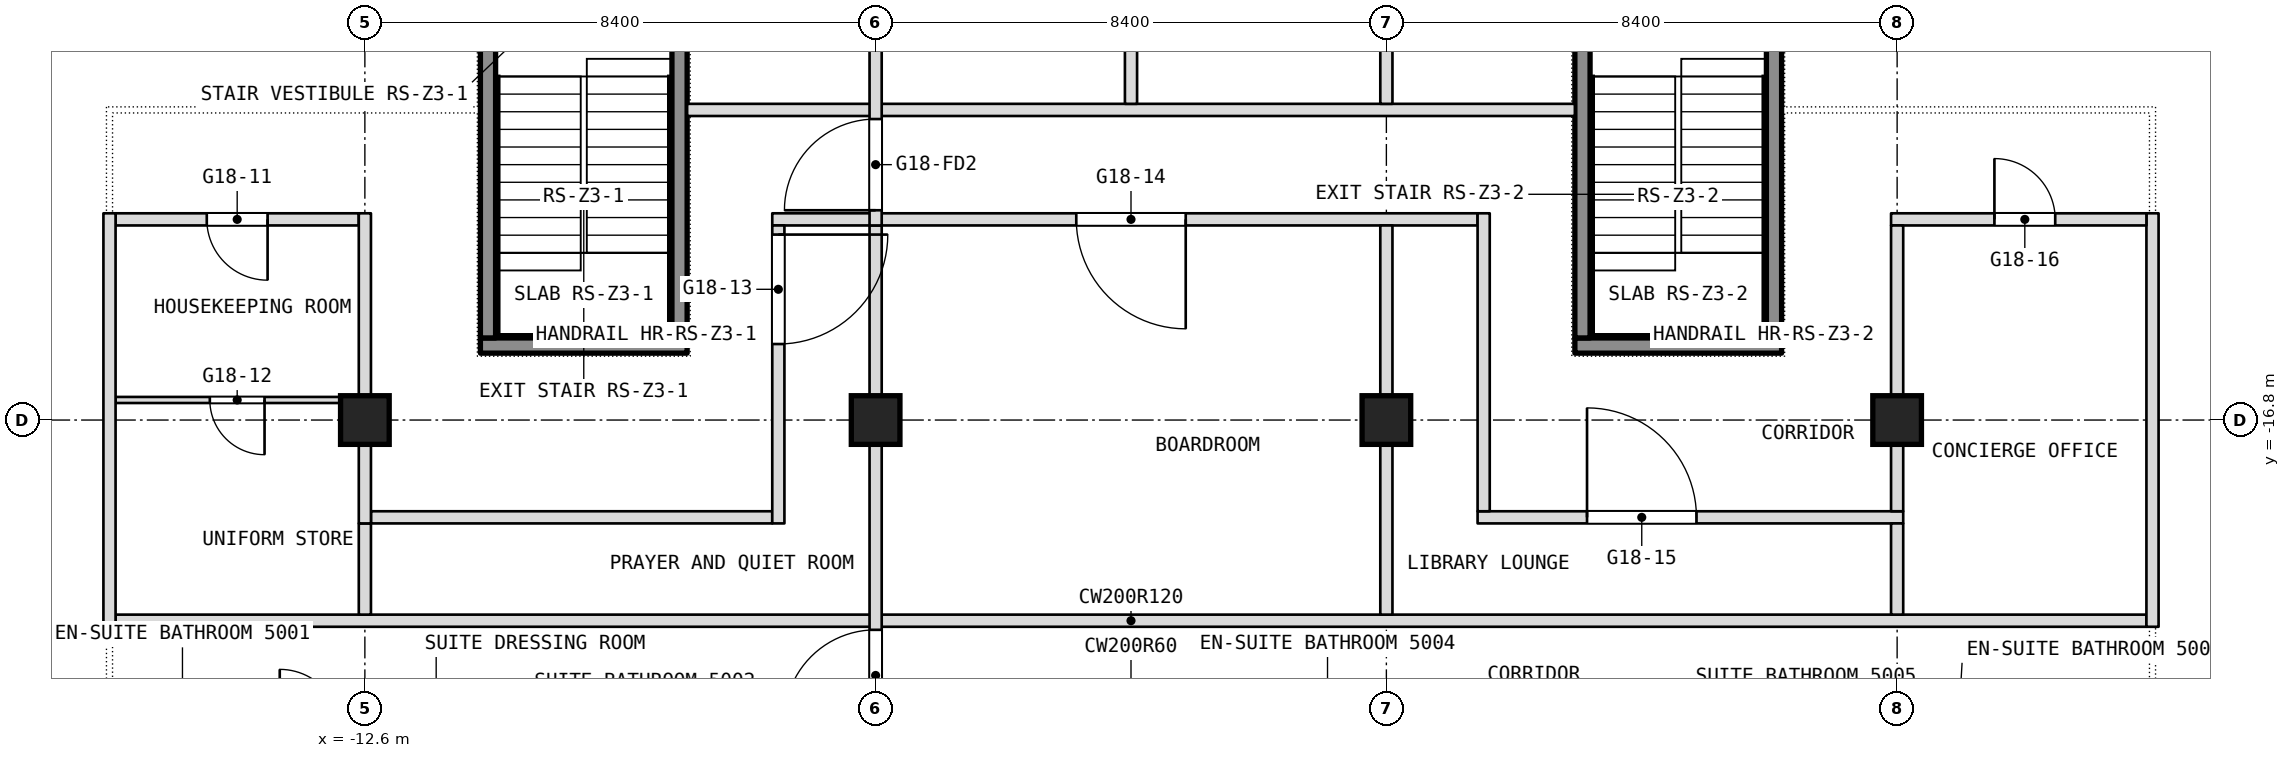
"""IFC4 building model, lengths in metres.
Left out: names, types, materials, properties, quantities, classifications, styles, units other than length and angle.
Written with IfcOpenShell. Run it as: python <this file> out.ifc"""

import sys

from ifc_helpers import new_model, si_unit, direction, frame, frame_2d, origin, origin_2d, place, context, subcontext, project, spatial, rectangle, extrude, element, fill, save


model = new_model("IFC4")
c1 = context("Model", 3, precision=1e-05, world=origin(), true_north=direction((0.0, 1.0)))
c2 = subcontext(c1, "Body", "Model", "MODEL_VIEW")
j1 = project(units=[si_unit("LENGTHUNIT", "METRE"), si_unit("PLANEANGLEUNIT", "RADIAN")], contexts=[c1])
p1 = place(None, origin())
s1 = spatial("IfcSite", under=j1, at=p1, CompositionType="ELEMENT")
p2 = place(p1, origin())
s2 = spatial("IfcBuilding", under=s1, at=p2, CompositionType="ELEMENT")
p3 = place(p2, frame((0.0, 0.0, 216.5)))
s3 = spatial("IfcBuildingStorey", under=s2, at=p3, CompositionType="ELEMENT", Elevation=216.5)
for number, where, z_axis, x_axis in (
    (1, (-12.6, -16.8, 0.0), (0.0, 0.0, 1.0), (1.0, 0.0, 0.0)),
    (2, (-4.2, -16.8, 0.0), (0.0, 0.0, 1.0), (1.0, 0.0, 0.0)),
    (3, (4.2, -16.8, 0.0), (0.0, 0.0, 1.0), (1.0, 0.0, 0.0)),
    (4, (12.6, -16.8, 0.0), (0.0, 0.0, 1.0), (1.0, 0.0, 0.0)),
):
    element("IfcColumn", number, at=place(p3, frame(where, z_axis=z_axis, x_axis=x_axis)), inside=s3, PredefinedType="COLUMN", context=c2, shape_type="SweptSolid", body=[
        extrude(rectangle(XDim=0.8, YDim=0.8, at=origin_2d()), origin(), (0.0, 0.0, 1.0), 3.6),
    ])
p4 = place(p3, frame((-16.7, -20.1, 0.0), z_axis=(0.0, 0.0, 1.0), x_axis=(1.0, 0.0, 0.0)))
e5 = element("IfcWall", 5, at=p4, inside=s3, PredefinedType="PARTITIONING", context=c2, shape_type="SweptSolid", body=[
    extrude(rectangle(XDim=33.4, YDim=0.2, at=frame_2d((16.7, 0.0))), origin(), (0.0, 0.0, 1.0), 3.34),
])
p5 = place(p3, frame((-12.5, -18.4, 0.0), z_axis=(0.0, 0.0, 1.0), x_axis=(1.0, 0.0, 0.0)))
e6 = element("IfcWall", 6, at=p5, inside=s3, PredefinedType="PARTITIONING", context=c2, shape_type="SweptSolid", body=[
    extrude(rectangle(XDim=6.6, YDim=0.2, at=frame_2d((3.3, 0.0))), origin(), (0.0, 0.0, 1.0), 3.34),
])
p6 = place(p3, frame((5.7, -18.4, 0.0), z_axis=(0.0, 0.0, 1.0), x_axis=(1.0, 0.0, 0.0)))
e7 = element("IfcWall", 7, at=p6, inside=s3, PredefinedType="PARTITIONING", context=c2, shape_type="SweptSolid", body=[
    extrude(rectangle(XDim=7.0, YDim=0.2, at=frame_2d((3.5, 0.0))), origin(), (0.0, 0.0, 1.0), 3.34),
])
p7 = place(p6, frame((1.8, 0.0, 0.0)))
e8 = element("IfcOpeningElement", 8, at=p7, cuts=e7, PredefinedType="OPENING", context=c2, shape_type="SweptSolid", body=[
    extrude(rectangle(XDim=1.8, YDim=2.1, at=frame_2d((0.9, 1.05))), frame((0.0, 0.1, 0.0), z_axis=(0.0, -1.0, 0.0), x_axis=(1.0, 0.0, 0.0)), (0.0, 0.0, 1.0), 0.2),
])
p8 = place(p3, frame((16.8, -20.2, 0.0), z_axis=(0.0, 0.0, 1.0), x_axis=(0.0, 1.0, 0.0)))
e9 = element("IfcWall", 9, at=p8, inside=s3, PredefinedType="PARTITIONING", context=c2, shape_type="SweptSolid", body=[
    extrude(rectangle(XDim=6.8, YDim=0.2, at=frame_2d((3.4, 0.0))), origin(), (0.0, 0.0, 1.0), 3.34),
])
p9 = place(p3, frame((-16.7, -16.47, 0.0), z_axis=(0.0, 0.0, 1.0), x_axis=(1.0, 0.0, 0.0)))
e10 = element("IfcWall", 10, at=p9, inside=s3, PredefinedType="PARTITIONING", context=c2, shape_type="SweptSolid", body=[
    extrude(rectangle(XDim=4.0, YDim=0.1, at=frame_2d((2.0, 0.0))), origin(), (0.0, 0.0, 1.0), 3.34),
])
p10 = place(p9, frame((1.55, 0.0, 0.0)))
e11 = element("IfcOpeningElement", 11, at=p10, cuts=e10, PredefinedType="OPENING", context=c2, shape_type="SweptSolid", body=[
    extrude(rectangle(XDim=0.9, YDim=2.1, at=frame_2d((0.45, 1.05))), frame((0.0, 0.05, 0.0), z_axis=(0.0, -1.0, 0.0), x_axis=(1.0, 0.0, 0.0)), (0.0, 0.0, 1.0), 0.1),
])
p11 = place(p3, frame((-16.7, -13.5, 0.0), z_axis=(0.0, 0.0, 1.0), x_axis=(1.0, 0.0, 0.0)))
e12 = element("IfcWall", 12, at=p11, inside=s3, PredefinedType="PARTITIONING", context=c2, shape_type="SweptSolid", body=[
    extrude(rectangle(XDim=4.0, YDim=0.2, at=frame_2d((2.0, 0.0))), origin(), (0.0, 0.0, 1.0), 3.34),
])
p12 = place(p11, frame((1.5, 0.0, 0.0)))
e13 = element("IfcOpeningElement", 13, at=p12, cuts=e12, PredefinedType="OPENING", context=c2, shape_type="SweptSolid", body=[
    extrude(rectangle(XDim=1.0, YDim=2.1, at=frame_2d((0.5, 1.05))), frame((0.0, 0.1, 0.0), z_axis=(0.0, -1.0, 0.0), x_axis=(1.0, 0.0, 0.0)), (0.0, 0.0, 1.0), 0.2),
])
p13 = place(p3, frame((-5.9, -13.5, 0.0), z_axis=(0.0, 0.0, 1.0), x_axis=(1.0, 0.0, 0.0)))
e14 = element("IfcWall", 14, at=p13, inside=s3, PredefinedType="PARTITIONING", context=c2, shape_type="SweptSolid", body=[
    extrude(rectangle(XDim=11.6, YDim=0.2, at=frame_2d((5.8, 0.0))), origin(), (0.0, 0.0, 1.0), 3.34),
])
p14 = place(p13, frame((5.0, 0.0, 0.0)))
e15 = element("IfcOpeningElement", 15, at=p14, cuts=e14, PredefinedType="OPENING", context=c2, shape_type="SweptSolid", body=[
    extrude(rectangle(XDim=1.8, YDim=2.1, at=frame_2d((0.9, 1.05))), frame((0.0, 0.1, 0.0), z_axis=(0.0, -1.0, 0.0), x_axis=(1.0, 0.0, 0.0)), (0.0, 0.0, 1.0), 0.2),
])
p15 = place(p3, frame((12.5, -13.5, 0.0), z_axis=(0.0, 0.0, 1.0), x_axis=(1.0, 0.0, 0.0)))
e16 = element("IfcWall", 16, at=p15, inside=s3, PredefinedType="PARTITIONING", context=c2, shape_type="SweptSolid", body=[
    extrude(rectangle(XDim=4.2, YDim=0.2, at=frame_2d((2.1, 0.0))), origin(), (0.0, 0.0, 1.0), 3.34),
])
p16 = place(p15, frame((1.7, 0.0, 0.0)))
e17 = element("IfcOpeningElement", 17, at=p16, cuts=e16, PredefinedType="OPENING", context=c2, shape_type="SweptSolid", body=[
    extrude(rectangle(XDim=1.0, YDim=2.1, at=frame_2d((0.5, 1.05))), frame((0.0, 0.1, 0.0), z_axis=(0.0, -1.0, 0.0), x_axis=(1.0, 0.0, 0.0)), (0.0, 0.0, 1.0), 0.2),
])
p17 = place(p3, frame((12.6, -20.0, 0.0), z_axis=(0.0, 0.0, 1.0), x_axis=(0.0, 1.0, 0.0)))
e18 = element("IfcWall", 18, at=p17, inside=s3, PredefinedType="PARTITIONING", context=c2, shape_type="SweptSolid", body=[
    extrude(rectangle(XDim=1.5, YDim=0.2, at=frame_2d((0.75, 0.0))), origin(), (0.0, 0.0, 1.0), 3.34),
])
p18 = place(p3, frame((12.6, -18.3, 0.0), z_axis=(0.0, 0.0, 1.0), x_axis=(0.0, 1.0, 0.0)))
e19 = element("IfcWall", 19, at=p18, inside=s3, PredefinedType="PARTITIONING", context=c2, shape_type="SweptSolid", body=[
    extrude(rectangle(XDim=4.7, YDim=0.2, at=frame_2d((2.35, 0.0))), origin(), (0.0, 0.0, 1.0), 3.34),
])
p19 = place(p3, frame((-7.3, -11.7, 0.0), z_axis=(0.0, 0.0, 1.0), x_axis=(1.0, 0.0, 0.0)))
e20 = element("IfcWall", 20, at=p19, inside=s3, PredefinedType="PARTITIONING", context=c2, shape_type="SweptSolid", body=[
    extrude(rectangle(XDim=14.6, YDim=0.2, at=frame_2d((7.3, 0.0))), origin(), (0.0, 0.0, 1.0), 3.34),
])
p20 = place(p3, frame((5.8, -18.3, 0.0), z_axis=(0.0, 0.0, 1.0), x_axis=(0.0, 1.0, 0.0)))
e21 = element("IfcWall", 21, at=p20, inside=s3, PredefinedType="PARTITIONING", context=c2, shape_type="SweptSolid", body=[
    extrude(rectangle(XDim=4.9, YDim=0.2, at=frame_2d((2.45, 0.0))), origin(), (0.0, 0.0, 1.0), 3.34),
])
p21 = place(p3, frame((4.2, -20.0, 0.0), z_axis=(0.0, 0.0, 1.0), x_axis=(0.0, 1.0, 0.0)))
e22 = element("IfcWall", 22, at=p21, inside=s3, PredefinedType="PARTITIONING", context=c2, shape_type="SweptSolid", body=[
    extrude(rectangle(XDim=6.4, YDim=0.2, at=frame_2d((3.2, 0.0))), origin(), (0.0, 0.0, 1.0), 3.34),
])
for number, where, z_axis, x_axis in (
    (23, (4.2, -11.6, 0.0), (0.0, 0.0, 1.0), (0.0, 1.0, 0.0)),
    (24, (0.0, -11.6, 0.0), (0.0, 0.0, 1.0), (0.0, 1.0, 0.0)),
):
    element("IfcWall", number, at=place(p3, frame(where, z_axis=z_axis, x_axis=x_axis)), inside=s3, PredefinedType="PARTITIONING", context=c2, shape_type="SweptSolid", body=[
        extrude(rectangle(XDim=9.7, YDim=0.2, at=frame_2d((4.85, 0.0))), origin(), (0.0, 0.0, 1.0), 3.34),
    ])
p22 = place(p3, frame((-4.2, -22.0, 0.0), z_axis=(0.0, 0.0, 1.0), x_axis=(0.0, 1.0, 0.0)))
e25 = element("IfcWall", 25, at=p22, inside=s3, PredefinedType="PARTITIONING", context=c2, shape_type="SweptSolid", body=[
    extrude(rectangle(XDim=8.4, YDim=0.2, at=frame_2d((4.2, 0.0))), origin(), (0.0, 0.0, 1.0), 3.34),
])
p23 = place(p22, frame((0.25, 0.0, 0.0)))
e26 = element("IfcOpeningElement", 26, at=p23, cuts=e25, PredefinedType="OPENING", context=c2, shape_type="SweptSolid", body=[
    extrude(rectangle(XDim=1.5, YDim=2.1, at=frame_2d((0.75, 1.05))), frame((0.0, 0.1, 0.0), z_axis=(0.0, -1.0, 0.0), x_axis=(1.0, 0.0, 0.0)), (0.0, 0.0, 1.0), 0.2),
])
p24 = place(p3, frame((-4.2, -13.6, 0.0), z_axis=(0.0, 0.0, 1.0), x_axis=(0.0, 1.0, 0.0)))
e27 = element("IfcWall", 27, at=p24, inside=s3, PredefinedType="PARTITIONING", context=c2, shape_type="SweptSolid", body=[
    extrude(rectangle(XDim=13.6, YDim=0.2, at=frame_2d((6.8, 0.0))), origin(), (0.0, 0.0, 1.0), 3.34),
])
p25 = place(p24, frame((11.95, 0.0, 0.0)))
e28 = element("IfcOpeningElement", 28, at=p25, cuts=e27, PredefinedType="OPENING", context=c2, shape_type="SweptSolid", body=[
    extrude(rectangle(XDim=1.5, YDim=2.1, at=frame_2d((0.75, 1.05))), frame((0.0, 0.1, 0.0), z_axis=(0.0, -1.0, 0.0), x_axis=(1.0, 0.0, 0.0)), (0.0, 0.0, 1.0), 0.2),
])
p26 = place(p24, frame((0.25, 0.0, 0.0)))
e29 = element("IfcOpeningElement", 29, at=p26, cuts=e27, PredefinedType="OPENING", context=c2, shape_type="SweptSolid", body=[
    extrude(rectangle(XDim=1.5, YDim=2.1, at=frame_2d((0.75, 1.05))), frame((0.0, 0.1, 0.0), z_axis=(0.0, -1.0, 0.0), x_axis=(1.0, 0.0, 0.0)), (0.0, 0.0, 1.0), 0.2),
])
p27 = place(p3, frame((-5.8, -18.5, 0.0), z_axis=(0.0, 0.0, 1.0), x_axis=(0.0, 1.0, 0.0)))
e30 = element("IfcWall", 30, at=p27, inside=s3, PredefinedType="PARTITIONING", context=c2, shape_type="SweptSolid", body=[
    extrude(rectangle(XDim=4.9, YDim=0.2, at=frame_2d((2.45, 0.0))), origin(), (0.0, 0.0, 1.0), 3.34),
])
p28 = place(p27, frame((2.95, 0.0, 0.0)))
e31 = element("IfcOpeningElement", 31, at=p28, cuts=e30, PredefinedType="OPENING", context=c2, shape_type="SweptSolid", body=[
    extrude(rectangle(XDim=1.8, YDim=2.1, at=frame_2d((0.9, 1.05))), frame((0.0, 0.1, 0.0), z_axis=(0.0, -1.0, 0.0), x_axis=(1.0, 0.0, 0.0)), (0.0, 0.0, 1.0), 0.2),
])
p29 = place(p3, frame((-12.6, -20.0, 0.0), z_axis=(0.0, 0.0, 1.0), x_axis=(0.0, 1.0, 0.0)))
e32 = element("IfcWall", 32, at=p29, inside=s3, PredefinedType="PARTITIONING", context=c2, shape_type="SweptSolid", body=[
    extrude(rectangle(XDim=1.5, YDim=0.2, at=frame_2d((0.75, 0.0))), origin(), (0.0, 0.0, 1.0), 3.34),
])
p30 = place(p3, frame((-12.6, -18.5, 0.0), z_axis=(0.0, 0.0, 1.0), x_axis=(0.0, 1.0, 0.0)))
e33 = element("IfcWall", 33, at=p30, inside=s3, PredefinedType="PARTITIONING", context=c2, shape_type="SweptSolid", body=[
    extrude(rectangle(XDim=5.1, YDim=0.2, at=frame_2d((2.55, 0.0))), origin(), (0.0, 0.0, 1.0), 3.34),
])
p31 = place(p3, frame((-16.8, -20.2, 0.0), z_axis=(0.0, 0.0, 1.0), x_axis=(0.0, 1.0, 0.0)))
e34 = element("IfcWall", 34, at=p31, inside=s3, PredefinedType="PARTITIONING", context=c2, shape_type="SweptSolid", body=[
    extrude(rectangle(XDim=6.8, YDim=0.2, at=frame_2d((3.4, 0.0))), origin(), (0.0, 0.0, 1.0), 3.34),
])
p32 = place(p3, frame((-10.7, -15.575, 0.1), z_axis=(0.0, 0.0, 1.0), x_axis=(1.0, 0.0, 0.0)))
e35 = element("IfcWall", 35, at=p32, inside=s3, PredefinedType="SHEAR", context=c2, shape_type="SweptSolid", body=[
    extrude(rectangle(XDim=3.4, YDim=0.25, at=frame_2d((1.7, 0.0))), origin(), (0.0, 0.0, 1.0), 3.6),
])
for number, where, z_axis, x_axis in (
    (36, (-10.575, -15.45, 0.1), (0.0, 0.0, 1.0), (0.0, 1.0, 0.0)),
    (37, (-7.425, -15.45, 0.1), (0.0, 0.0, 1.0), (0.0, 1.0, 0.0)),
):
    element("IfcWall", number, at=place(p3, frame(where, z_axis=z_axis, x_axis=x_axis)), inside=s3, PredefinedType="SHEAR", context=c2, shape_type="SweptSolid", body=[
        extrude(rectangle(XDim=5.7, YDim=0.25, at=frame_2d((2.85, 0.0))), origin(), (0.0, 0.0, 1.0), 3.6),
    ])
p33 = place(p3, frame((7.3, -15.575, 0.1), z_axis=(0.0, 0.0, 1.0), x_axis=(1.0, 0.0, 0.0)))
e38 = element("IfcWall", 38, at=p33, inside=s3, PredefinedType="SHEAR", context=c2, shape_type="SweptSolid", body=[
    extrude(rectangle(XDim=3.4, YDim=0.25, at=frame_2d((1.7, 0.0))), origin(), (0.0, 0.0, 1.0), 3.6),
])
for number, where, z_axis, x_axis in (
    (39, (7.425, -15.45, 0.1), (0.0, 0.0, 1.0), (0.0, 1.0, 0.0)),
    (40, (10.575, -15.45, 0.1), (0.0, 0.0, 1.0), (0.0, 1.0, 0.0)),
):
    element("IfcWall", number, at=place(p3, frame(where, z_axis=z_axis, x_axis=x_axis)), inside=s3, PredefinedType="SHEAR", context=c2, shape_type="SweptSolid", body=[
        extrude(rectangle(XDim=5.7, YDim=0.25, at=frame_2d((2.85, 0.0))), origin(), (0.0, 0.0, 1.0), 3.6),
    ])
p34 = place(p7, origin())
e41 = element("IfcDoor", 41, at=p34, inside=s3, OperationType="DOUBLE_DOOR_SINGLE_SWING", PredefinedType="DOOR", context=c2, shape_type="SweptSolid", body=[
    extrude(rectangle(XDim=1.8, YDim=2.1, at=frame_2d((0.9, 1.05))), frame((0.0, 0.025, 0.0), z_axis=(0.0, -1.0, 0.0), x_axis=(1.0, 0.0, 0.0)), (0.0, 0.0, 1.0), 0.05),
])
fill(e8, e41)
p35 = place(p10, origin())
e42 = element("IfcDoor", 42, at=p35, inside=s3, OperationType="SINGLE_SWING_LEFT", PredefinedType="DOOR", context=c2, shape_type="SweptSolid", body=[
    extrude(rectangle(XDim=0.9, YDim=2.1, at=frame_2d((0.45, 1.05))), frame((0.0, 0.025, 0.0), z_axis=(0.0, -1.0, 0.0), x_axis=(1.0, 0.0, 0.0)), (0.0, 0.0, 1.0), 0.05),
])
fill(e11, e42)
p36 = place(p12, origin())
e43 = element("IfcDoor", 43, at=p36, inside=s3, OperationType="SINGLE_SWING_LEFT", PredefinedType="DOOR", context=c2, shape_type="SweptSolid", body=[
    extrude(rectangle(XDim=1.0, YDim=2.1, at=frame_2d((0.5, 1.05))), frame((0.0, 0.025, 0.0), z_axis=(0.0, -1.0, 0.0), x_axis=(1.0, 0.0, 0.0)), (0.0, 0.0, 1.0), 0.05),
])
fill(e13, e43)
p37 = place(p14, origin())
e44 = element("IfcDoor", 44, at=p37, inside=s3, OperationType="DOUBLE_DOOR_SINGLE_SWING", PredefinedType="DOOR", context=c2, shape_type="SweptSolid", body=[
    extrude(rectangle(XDim=1.8, YDim=2.1, at=frame_2d((0.9, 1.05))), frame((0.0, 0.025, 0.0), z_axis=(0.0, -1.0, 0.0), x_axis=(1.0, 0.0, 0.0)), (0.0, 0.0, 1.0), 0.05),
])
fill(e15, e44)
p38 = place(p16, origin())
e45 = element("IfcDoor", 45, at=p38, inside=s3, OperationType="SINGLE_SWING_RIGHT", PredefinedType="DOOR", context=c2, shape_type="SweptSolid", body=[
    extrude(rectangle(XDim=1.0, YDim=2.1, at=frame_2d((0.5, 1.05))), frame((0.0, 0.025, 0.0), z_axis=(0.0, -1.0, 0.0), x_axis=(1.0, 0.0, 0.0)), (0.0, 0.0, 1.0), 0.05),
])
fill(e17, e45)
p39 = place(p28, origin())
e46 = element("IfcDoor", 46, at=p39, inside=s3, OperationType="DOUBLE_DOOR_SINGLE_SWING", PredefinedType="DOOR", context=c2, shape_type="SweptSolid", body=[
    extrude(rectangle(XDim=1.8, YDim=2.1, at=frame_2d((0.9, 1.05))), frame((0.0, 0.025, 0.0), z_axis=(0.0, -1.0, 0.0), x_axis=(1.0, 0.0, 0.0)), (0.0, 0.0, 1.0), 0.05),
])
fill(e31, e46)
p40 = place(p26, origin())
e47 = element("IfcDoor", 47, at=p40, inside=s3, OperationType="DOUBLE_DOOR_DOUBLE_SWING", PredefinedType="DOOR", context=c2, shape_type="SweptSolid", body=[
    extrude(rectangle(XDim=1.5, YDim=2.1, at=frame_2d((0.75, 1.05))), frame((0.0, 0.025, 0.0), z_axis=(0.0, -1.0, 0.0), x_axis=(1.0, 0.0, 0.0)), (0.0, 0.0, 1.0), 0.05),
])
fill(e29, e47)
p41 = place(p23, origin())
e48 = element("IfcDoor", 48, at=p41, inside=s3, OperationType="DOUBLE_DOOR_DOUBLE_SWING", PredefinedType="DOOR", context=c2, shape_type="SweptSolid", body=[
    extrude(rectangle(XDim=1.5, YDim=2.1, at=frame_2d((0.75, 1.05))), frame((0.0, 0.025, 0.0), z_axis=(0.0, -1.0, 0.0), x_axis=(1.0, 0.0, 0.0)), (0.0, 0.0, 1.0), 0.05),
])
fill(e26, e48)
save(model, sys.argv[1])
